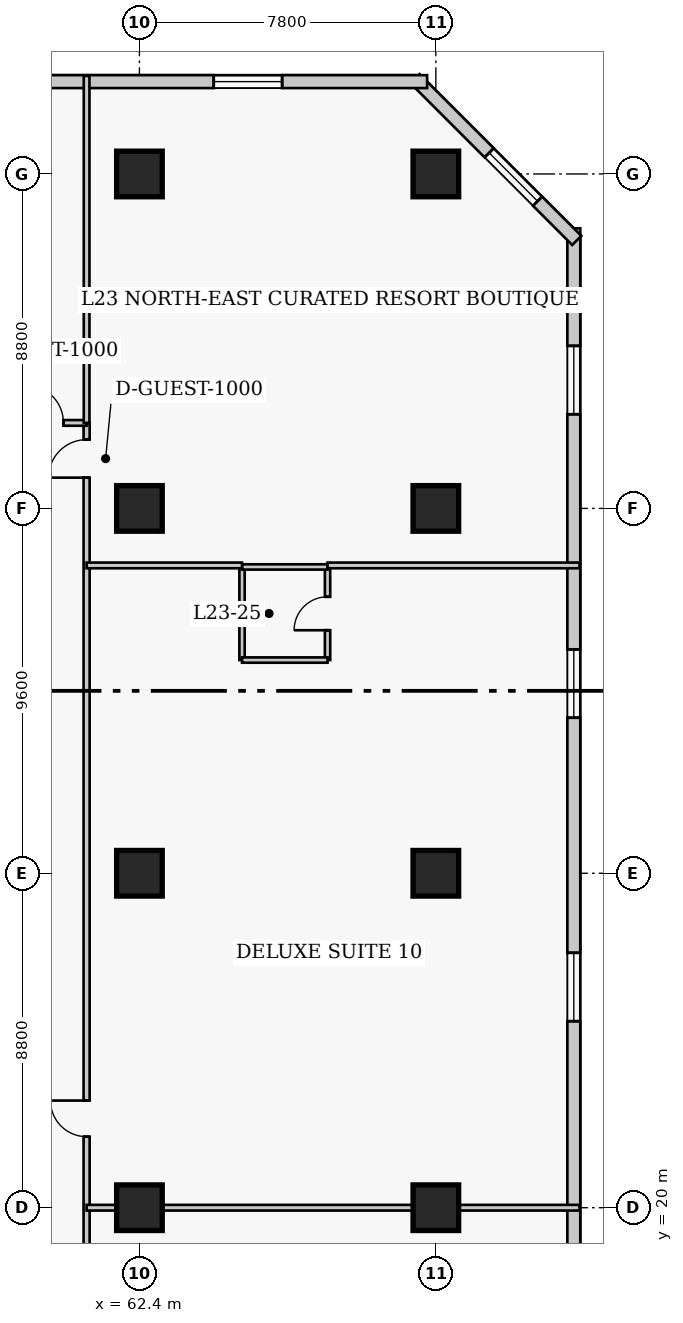
"""IFC4 building model, lengths in metres.
Left out: names, types, materials, properties, quantities, classifications, styles, units other than length and angle.
Written with IfcOpenShell. Run it as: python <this file> out.ifc"""

import sys

from ifc_helpers import new_model, si_unit, direction, frame, frame_2d, origin, origin_2d, place, context, subcontext, project, spatial, rectangle, extrude, element, fill, save


model = new_model("IFC4")
c1 = context("Model", 3, precision=1e-05, world=origin(), true_north=direction((0.0, 1.0)))
c2 = subcontext(c1, "Body", "Model", "MODEL_VIEW")
j1 = project(units=[si_unit("LENGTHUNIT", "METRE"), si_unit("PLANEANGLEUNIT", "RADIAN")], contexts=[c1])
p1 = place(None, origin())
s1 = spatial("IfcSite", under=j1, at=p1, CompositionType="ELEMENT")
p2 = place(p1, origin())
s2 = spatial("IfcBuilding", under=s1, at=p2, CompositionType="ELEMENT")
p3 = place(p2, frame((0.0, 0.0, 95.6)))
s3 = spatial("IfcBuildingStorey", under=s2, at=p3, CompositionType="ELEMENT", Elevation=95.6)
for number, where, z_axis, x_axis in (
    (1, (62.4, 20.0, 0.0), (0.0, 0.0, 1.0), (1.0, 0.0, 0.0)),
    (2, (62.4, 28.8, 0.0), (0.0, 0.0, 1.0), (1.0, 0.0, 0.0)),
    (3, (62.4, 38.4, 0.0), (0.0, 0.0, 1.0), (1.0, 0.0, 0.0)),
    (4, (62.4, 47.2, 0.0), (0.0, 0.0, 1.0), (1.0, 0.0, 0.0)),
    (5, (70.2, 20.0, 0.0), (0.0, 0.0, 1.0), (1.0, 0.0, 0.0)),
    (6, (70.2, 28.8, 0.0), (0.0, 0.0, 1.0), (1.0, 0.0, 0.0)),
    (7, (70.2, 38.4, 0.0), (0.0, 0.0, 1.0), (1.0, 0.0, 0.0)),
    (8, (70.2, 47.2, 0.0), (0.0, 0.0, 1.0), (1.0, 0.0, 0.0)),
):
    element("IfcColumn", number, at=place(p3, frame(where, z_axis=z_axis, x_axis=x_axis)), inside=s3, PredefinedType="COLUMN", context=c2, shape_type="SweptSolid", body=[
        extrude(rectangle(XDim=1.2, YDim=1.2, at=origin_2d()), origin(), (0.0, 0.0, 1.0), 3.8),
    ])
p4 = place(p3, frame((73.83, 13.83, 0.0), z_axis=(0.0, 0.0, 1.0), x_axis=(0.0, 1.0, 0.0)))
e9 = element("IfcWall", 9, at=p4, inside=s3, PredefinedType="SOLIDWALL", context=c2, shape_type="SweptSolid", body=[
    extrude(rectangle(XDim=31.94, YDim=0.34, at=frame_2d((15.97, 0.0))), origin(), (0.0, 0.0, 1.0), 3.54),
])
p5 = place(p4, frame((3.093, 0.0, 0.85)))
e10 = element("IfcOpeningElement", 10, at=p5, cuts=e9, PredefinedType="OPENING", context=c2, shape_type="SweptSolid", body=[
    extrude(rectangle(XDim=1.8, YDim=1.8, at=frame_2d((0.9, 0.9))), frame((0.0, 0.18, 0.0), z_axis=(0.0, -1.0, 0.0), x_axis=(1.0, 0.0, 0.0)), (0.0, 0.0, 1.0), 0.36),
])
p6 = place(p4, frame((11.077, 0.0, 0.85)))
e11 = element("IfcOpeningElement", 11, at=p6, cuts=e9, PredefinedType="OPENING", context=c2, shape_type="SweptSolid", body=[
    extrude(rectangle(XDim=1.8, YDim=1.8, at=frame_2d((0.9, 0.9))), frame((0.0, 0.18, 0.0), z_axis=(0.0, -1.0, 0.0), x_axis=(1.0, 0.0, 0.0)), (0.0, 0.0, 1.0), 0.36),
])
p7 = place(p4, frame((19.062, 0.0, 0.85)))
e12 = element("IfcOpeningElement", 12, at=p7, cuts=e9, PredefinedType="OPENING", context=c2, shape_type="SweptSolid", body=[
    extrude(rectangle(XDim=1.8, YDim=1.8, at=frame_2d((0.9, 0.9))), frame((0.0, 0.18, 0.0), z_axis=(0.0, -1.0, 0.0), x_axis=(1.0, 0.0, 0.0)), (0.0, 0.0, 1.0), 0.36),
])
p8 = place(p4, frame((27.048, 0.0, 0.85)))
e13 = element("IfcOpeningElement", 13, at=p8, cuts=e9, PredefinedType="OPENING", context=c2, shape_type="SweptSolid", body=[
    extrude(rectangle(XDim=1.8, YDim=1.8, at=frame_2d((0.9, 0.9))), frame((0.0, 0.18, 0.0), z_axis=(0.0, -1.0, 0.0), x_axis=(1.0, 0.0, 0.0)), (0.0, 0.0, 1.0), 0.36),
])
p9 = place(p3, frame((73.908, 45.451, 0.0), z_axis=(0.0, 0.0, 1.0), x_axis=(-0.707106781187, 0.707106781187, 0.0)))
e14 = element("IfcWall", 14, at=p9, inside=s3, PredefinedType="SOLIDWALL", context=c2, shape_type="SweptSolid", body=[
    extrude(rectangle(XDim=6.02, YDim=0.34, at=frame_2d((3.01, 0.0))), origin(), (0.0, 0.0, 1.0), 3.54),
])
p10 = place(p9, frame((1.46, 0.0, 0.85)))
e15 = element("IfcOpeningElement", 15, at=p10, cuts=e14, PredefinedType="OPENING", context=c2, shape_type="SweptSolid", body=[
    extrude(rectangle(XDim=1.8, YDim=1.8, at=frame_2d((0.9, 0.9))), frame((0.0, 0.18, 0.0), z_axis=(0.0, -1.0, 0.0), x_axis=(1.0, 0.0, 0.0)), (0.0, 0.0, 1.0), 0.36),
])
p11 = place(p3, frame((69.97, 49.63, 0.0), z_axis=(0.0, 0.0, 1.0), x_axis=(-1.0, 0.0, 0.0)))
e16 = element("IfcWall", 16, at=p11, inside=s3, PredefinedType="SOLIDWALL", context=c2, shape_type="SweptSolid", body=[
    extrude(rectangle(XDim=28.29, YDim=0.34, at=frame_2d((14.145, 0.0))), origin(), (0.0, 0.0, 1.0), 3.54),
])
p12 = place(p11, frame((3.815, 0.0, 0.85)))
e17 = element("IfcOpeningElement", 17, at=p12, cuts=e16, PredefinedType="OPENING", context=c2, shape_type="SweptSolid", body=[
    extrude(rectangle(XDim=1.8, YDim=1.8, at=frame_2d((0.9, 0.9))), frame((0.0, 0.18, 0.0), z_axis=(0.0, -1.0, 0.0), x_axis=(1.0, 0.0, 0.0)), (0.0, 0.0, 1.0), 0.36),
])
p13 = place(p11, frame((13.245, 0.0, 0.85)))
e18 = element("IfcOpeningElement", 18, at=p13, cuts=e16, PredefinedType="OPENING", context=c2, shape_type="SweptSolid", body=[
    extrude(rectangle(XDim=1.8, YDim=1.8, at=frame_2d((0.9, 0.9))), frame((0.0, 0.18, 0.0), z_axis=(0.0, -1.0, 0.0), x_axis=(1.0, 0.0, 0.0)), (0.0, 0.0, 1.0), 0.36),
])
p14 = place(p11, frame((22.675, 0.0, 0.85)))
e19 = element("IfcOpeningElement", 19, at=p14, cuts=e16, PredefinedType="OPENING", context=c2, shape_type="SweptSolid", body=[
    extrude(rectangle(XDim=1.8, YDim=1.8, at=frame_2d((0.9, 0.9))), frame((0.0, 0.18, 0.0), z_axis=(0.0, -1.0, 0.0), x_axis=(1.0, 0.0, 0.0)), (0.0, 0.0, 1.0), 0.36),
])
p15 = place(p3, frame((61.01, 11.85, 0.0), z_axis=(0.0, 0.0, 1.0), x_axis=(0.0, 1.0, 0.0)))
e20 = element("IfcWall", 20, at=p15, inside=s3, PredefinedType="PARTITIONING", context=c2, shape_type="SweptSolid", body=[
    extrude(rectangle(XDim=28.8, YDim=0.16, at=frame_2d((14.4, 0.0))), origin(), (0.0, 0.0, 1.0), 3.54),
])
p16 = place(p15, frame((3.6, 0.0, 0.0)))
e21 = element("IfcOpeningElement", 21, at=p16, cuts=e20, PredefinedType="OPENING", context=c2, shape_type="SweptSolid", body=[
    extrude(rectangle(XDim=0.95, YDim=2.1, at=frame_2d((0.475, 1.05))), frame((0.0, 0.09, 0.0), z_axis=(0.0, -1.0, 0.0), x_axis=(1.0, 0.0, 0.0)), (0.0, 0.0, 1.0), 0.18),
])
p17 = place(p15, frame((10.019, 0.0, 0.0)))
e22 = element("IfcOpeningElement", 22, at=p17, cuts=e20, PredefinedType="OPENING", context=c2, shape_type="SweptSolid", body=[
    extrude(rectangle(XDim=0.95, YDim=2.1, at=frame_2d((0.475, 1.05))), frame((0.0, 0.09, 0.0), z_axis=(0.0, -1.0, 0.0), x_axis=(1.0, 0.0, 0.0)), (0.0, 0.0, 1.0), 0.18),
])
p18 = place(p15, frame((27.36, 0.0, 0.0)))
e23 = element("IfcOpeningElement", 23, at=p18, cuts=e20, PredefinedType="OPENING", context=c2, shape_type="SweptSolid", body=[
    extrude(rectangle(XDim=1.0, YDim=2.15, at=frame_2d((0.5, 1.075))), frame((0.0, 0.09, 0.0), z_axis=(0.0, -1.0, 0.0), x_axis=(1.0, 0.0, 0.0)), (0.0, 0.0, 1.0), 0.18),
])
p19 = place(p3, frame((56.8, 40.65, 0.0), z_axis=(0.0, 0.0, 1.0), x_axis=(1.0, 0.0, 0.0)))
e24 = element("IfcWall", 24, at=p19, inside=s3, PredefinedType="PARTITIONING", context=c2, shape_type="SweptSolid", body=[
    extrude(rectangle(XDim=4.21, YDim=0.15, at=frame_2d((2.105, 0.0))), origin(), (0.0, 0.0, 1.0), 3.54),
])
p20 = place(p19, frame((2.6, 0.0, 0.0)))
e25 = element("IfcOpeningElement", 25, at=p20, cuts=e24, PredefinedType="OPENING", context=c2, shape_type="SweptSolid", body=[
    extrude(rectangle(XDim=1.0, YDim=2.15, at=frame_2d((0.5, 1.075))), frame((0.0, 0.085, 0.0), z_axis=(0.0, -1.0, 0.0), x_axis=(1.0, 0.0, 0.0)), (0.0, 0.0, 1.0), 0.17),
])
p21 = place(p3, frame((61.01, 40.65, 0.0), z_axis=(0.0, 0.0, 1.0), x_axis=(0.0, 1.0, 0.0)))
e26 = element("IfcWall", 26, at=p21, inside=s3, PredefinedType="PARTITIONING", context=c2, shape_type="SweptSolid", body=[
    extrude(rectangle(XDim=9.13, YDim=0.15, at=frame_2d((4.565, 0.0))), origin(), (0.0, 0.0, 1.0), 3.54),
])
p22 = place(p3, frame((61.01, 20.0, 0.0), z_axis=(0.0, 0.0, 1.0), x_axis=(1.0, 0.0, 0.0)))
e27 = element("IfcWall", 27, at=p22, inside=s3, PredefinedType="PARTITIONING", context=c2, shape_type="SweptSolid", body=[
    extrude(rectangle(XDim=12.97, YDim=0.15, at=frame_2d((6.485, 0.0))), origin(), (0.0, 0.0, 1.0), 2.679),
])
p23 = place(p3, frame((65.1, 34.41, 0.0), z_axis=(0.0, 0.0, 1.0), x_axis=(0.0, 1.0, 0.0)))
e28 = element("IfcWall", 28, at=p23, inside=s3, PredefinedType="PLUMBINGWALL", context=c2, shape_type="SweptSolid", body=[
    extrude(rectangle(XDim=2.45, YDim=0.14, at=frame_2d((1.225, 0.0))), origin(), (0.0, 0.0, 1.0), 3.54),
])
p24 = place(p3, frame((67.35, 34.41, 0.0), z_axis=(0.0, 0.0, 1.0), x_axis=(0.0, 1.0, 0.0)))
e29 = element("IfcWall", 29, at=p24, inside=s3, PredefinedType="PLUMBINGWALL", context=c2, shape_type="SweptSolid", body=[
    extrude(rectangle(XDim=2.45, YDim=0.14, at=frame_2d((1.225, 0.0))), origin(), (0.0, 0.0, 1.0), 3.54),
])
p25 = place(p24, frame((0.785, 0.0, 0.0)))
e30 = element("IfcOpeningElement", 30, at=p25, cuts=e29, PredefinedType="OPENING", context=c2, shape_type="SweptSolid", body=[
    extrude(rectangle(XDim=0.88, YDim=2.05, at=frame_2d((0.44, 1.025))), frame((0.0, 0.08, 0.0), z_axis=(0.0, -1.0, 0.0), x_axis=(1.0, 0.0, 0.0)), (0.0, 0.0, 1.0), 0.16),
])
for number, where, z_axis, x_axis in (
    (31, (65.1, 34.41, 0.0), (0.0, 0.0, 1.0), (1.0, 0.0, 0.0)),
    (32, (65.1, 36.86, 0.0), (0.0, 0.0, 1.0), (1.0, 0.0, 0.0)),
):
    element("IfcWall", number, at=place(p3, frame(where, z_axis=z_axis, x_axis=x_axis)), inside=s3, PredefinedType="PLUMBINGWALL", context=c2, shape_type="SweptSolid", body=[
        extrude(rectangle(XDim=2.25, YDim=0.14, at=frame_2d((1.125, 0.0))), origin(), (0.0, 0.0, 1.0), 3.54),
    ])
p26 = place(p3, frame((61.01, 36.9, 0.0), z_axis=(0.0, 0.0, 1.0), x_axis=(1.0, 0.0, 0.0)))
e33 = element("IfcWall", 33, at=p26, inside=s3, PredefinedType="PARTITIONING", context=c2, shape_type="SweptSolid", body=[
    extrude(rectangle(XDim=4.09, YDim=0.15, at=frame_2d((2.045, 0.0))), origin(), (0.0, 0.0, 1.0), 3.54),
])
p27 = place(p3, frame((67.35, 36.9, 0.0), z_axis=(0.0, 0.0, 1.0), x_axis=(1.0, 0.0, 0.0)))
e34 = element("IfcWall", 34, at=p27, inside=s3, PredefinedType="PARTITIONING", context=c2, shape_type="SweptSolid", body=[
    extrude(rectangle(XDim=6.63, YDim=0.15, at=frame_2d((3.315, 0.0))), origin(), (0.0, 0.0, 1.0), 3.54),
])
p28 = place(p6, origin())
e35 = element("IfcWindow", 35, at=p28, inside=s3, PartitioningType="SINGLE_PANEL", PredefinedType="WINDOW", context=c2, shape_type="SweptSolid", body=[
    extrude(rectangle(XDim=1.8, YDim=1.8, at=frame_2d((0.9, 0.9))), frame((0.0, 0.03, 0.0), z_axis=(0.0, -1.0, 0.0), x_axis=(1.0, 0.0, 0.0)), (0.0, 0.0, 1.0), 0.06),
])
fill(e11, e35)
p29 = place(p7, origin())
e36 = element("IfcWindow", 36, at=p29, inside=s3, PartitioningType="SINGLE_PANEL", PredefinedType="WINDOW", context=c2, shape_type="SweptSolid", body=[
    extrude(rectangle(XDim=1.8, YDim=1.8, at=frame_2d((0.9, 0.9))), frame((0.0, 0.03, 0.0), z_axis=(0.0, -1.0, 0.0), x_axis=(1.0, 0.0, 0.0)), (0.0, 0.0, 1.0), 0.06),
])
fill(e12, e36)
p30 = place(p8, origin())
e37 = element("IfcWindow", 37, at=p30, inside=s3, PartitioningType="SINGLE_PANEL", PredefinedType="WINDOW", context=c2, shape_type="SweptSolid", body=[
    extrude(rectangle(XDim=1.8, YDim=1.8, at=frame_2d((0.9, 0.9))), frame((0.0, 0.03, 0.0), z_axis=(0.0, -1.0, 0.0), x_axis=(1.0, 0.0, 0.0)), (0.0, 0.0, 1.0), 0.06),
])
fill(e13, e37)
p31 = place(p10, origin())
e38 = element("IfcWindow", 38, at=p31, inside=s3, PartitioningType="SINGLE_PANEL", PredefinedType="WINDOW", context=c2, shape_type="SweptSolid", body=[
    extrude(rectangle(XDim=1.8, YDim=1.8, at=frame_2d((0.9, 0.9))), frame((0.0, 0.03, 0.0), z_axis=(0.0, -1.0, 0.0), x_axis=(1.0, 0.0, 0.0)), (0.0, 0.0, 1.0), 0.06),
])
fill(e15, e38)
p32 = place(p12, origin())
e39 = element("IfcWindow", 39, at=p32, inside=s3, PartitioningType="SINGLE_PANEL", PredefinedType="WINDOW", context=c2, shape_type="SweptSolid", body=[
    extrude(rectangle(XDim=1.8, YDim=1.8, at=frame_2d((0.9, 0.9))), frame((0.0, 0.03, 0.0), z_axis=(0.0, -1.0, 0.0), x_axis=(1.0, 0.0, 0.0)), (0.0, 0.0, 1.0), 0.06),
])
fill(e17, e39)
p33 = place(p20, origin())
e40 = element("IfcDoor", 40, at=p33, inside=s3, OperationType="SINGLE_SWING_LEFT", PredefinedType="DOOR", context=c2, shape_type="SweptSolid", body=[
    extrude(rectangle(XDim=1.0, YDim=2.15, at=frame_2d((0.5, 1.075))), frame((0.0, 0.025, 0.0), z_axis=(0.0, -1.0, 0.0), x_axis=(1.0, 0.0, 0.0)), (0.0, 0.0, 1.0), 0.05),
])
fill(e25, e40)
p34 = place(p25, origin())
e41 = element("IfcDoor", 41, at=p34, inside=s3, OperationType="SINGLE_SWING_LEFT", PredefinedType="DOOR", context=c2, shape_type="SweptSolid", body=[
    extrude(rectangle(XDim=0.88, YDim=2.05, at=frame_2d((0.44, 1.025))), frame((0.0, 0.025, 0.0), z_axis=(0.0, -1.0, 0.0), x_axis=(1.0, 0.0, 0.0)), (0.0, 0.0, 1.0), 0.05),
])
fill(e30, e41)
p35 = place(p17, origin())
e42 = element("IfcDoor", 42, at=p35, inside=s3, OperationType="SINGLE_SWING_RIGHT", PredefinedType="DOOR", context=c2, shape_type="SweptSolid", body=[
    extrude(rectangle(XDim=0.95, YDim=2.1, at=frame_2d((0.475, 1.05))), frame((0.0, 0.025, 0.0), z_axis=(0.0, -1.0, 0.0), x_axis=(1.0, 0.0, 0.0)), (0.0, 0.0, 1.0), 0.05),
])
fill(e22, e42)
p36 = place(p18, origin())
e43 = element("IfcDoor", 43, at=p36, inside=s3, OperationType="SINGLE_SWING_LEFT", PredefinedType="DOOR", context=c2, shape_type="SweptSolid", body=[
    extrude(rectangle(XDim=1.0, YDim=2.15, at=frame_2d((0.5, 1.075))), frame((0.0, 0.025, 0.0), z_axis=(0.0, -1.0, 0.0), x_axis=(1.0, 0.0, 0.0)), (0.0, 0.0, 1.0), 0.05),
])
fill(e23, e43)
save(model, sys.argv[1])
